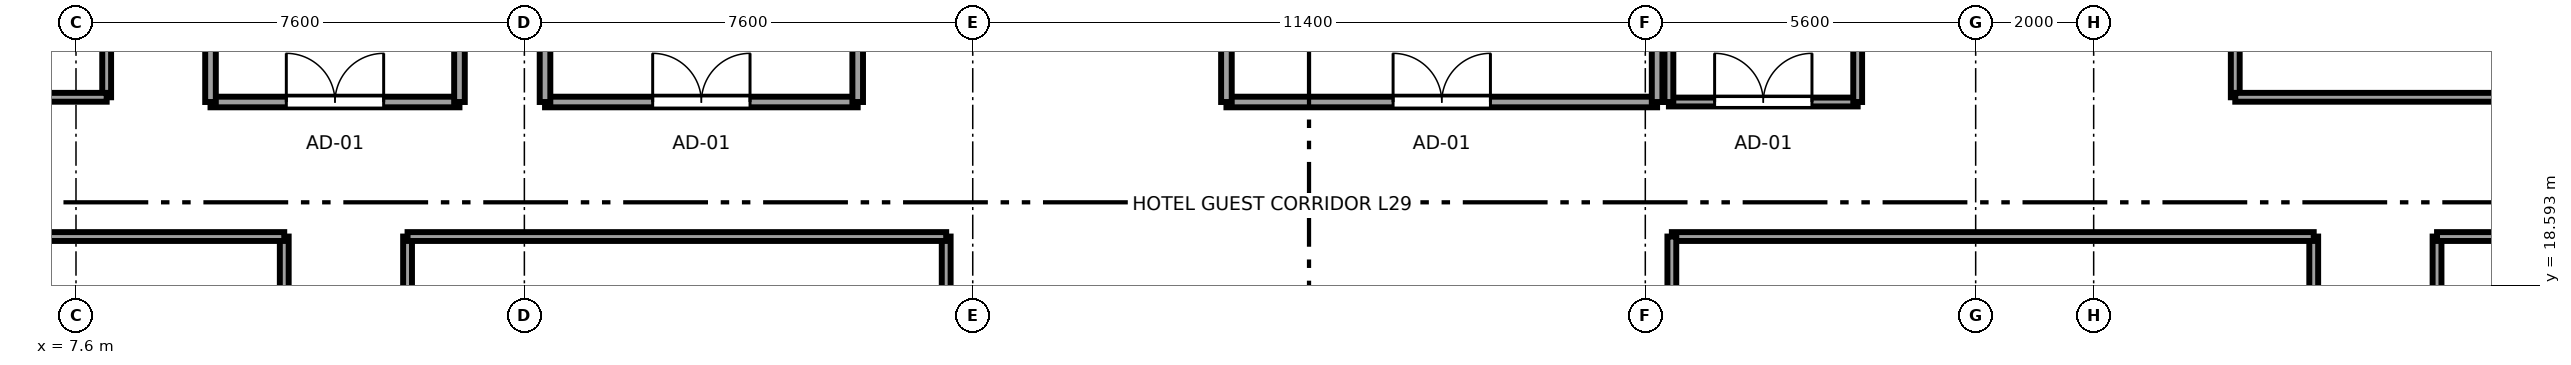
"""IFC4 building model, lengths in metres.
Left out: names, types, materials, properties, quantities, classifications, styles, units other than length and angle.
Written with IfcOpenShell. Run it as: python <this file> out.ifc"""

import sys

from ifc_helpers import new_model, si_unit, direction, frame, frame_2d, origin, place, context, subcontext, project, spatial, rectangle, extrude, source, transform, mapped, element, fill, save


model = new_model("IFC4")
c1 = context("Model", 3, precision=1e-05, world=origin(), true_north=direction((0.0, 1.0)))
c2 = subcontext(c1, "Body", "Model", "MODEL_VIEW")
j1 = project(units=[si_unit("LENGTHUNIT", "METRE"), si_unit("PLANEANGLEUNIT", "RADIAN")], contexts=[c1])
p1 = place(None, origin())
s1 = spatial("IfcSite", under=j1, at=p1, CompositionType="ELEMENT")
p2 = place(p1, origin())
s2 = spatial("IfcBuilding", under=s1, at=p2, CompositionType="ELEMENT")
p3 = place(p2, frame((0.0, 0.0, 115.1)))
s3 = spatial("IfcBuildingStorey", under=s2, at=p3, CompositionType="ELEMENT", Elevation=115.1)
p4 = place(p3, frame((11.13, 15.41, 0.0), z_axis=(0.0, 0.0, 1.0), x_axis=(0.0, 1.0, 0.0)))
e1 = element("IfcWall", 1, at=p4, inside=s3, PredefinedType="PARTITIONING", context=c2, shape_type="SweptSolid", body=[
    extrude(rectangle(XDim=4.01, YDim=0.15, at=frame_2d((2.005, 0.0))), origin(), (0.0, 0.0, 1.0), 3.37),
])
p5 = place(p4, frame((1.495, 0.0, 0.0)))
e2 = element("IfcOpeningElement", 2, at=p5, cuts=e1, PredefinedType="OPENING", context=c2, shape_type="SweptSolid", body=[
    extrude(rectangle(XDim=0.98, YDim=2.12, at=frame_2d((0.49, 1.06))), frame((0.0, 0.085, 0.0), z_axis=(0.0, -1.0, 0.0), x_axis=(1.0, 0.0, 0.0)), (0.0, 0.0, 1.0), 0.17),
])
p6 = place(p3, frame((0.405, 19.42, 0.0), z_axis=(0.0, 0.0, 1.0), x_axis=(1.0, 0.0, 0.0)))
e3 = element("IfcWall", 3, at=p6, inside=s3, PredefinedType="PARTITIONING", context=c2, shape_type="SweptSolid", body=[
    extrude(rectangle(XDim=10.725, YDim=0.15, at=frame_2d((5.362, 0.0))), origin(), (0.0, 0.0, 1.0), 3.37),
])
p7 = place(p3, frame((13.22, 12.01, 0.0), z_axis=(0.0, 0.0, 1.0), x_axis=(0.0, 1.0, 0.0)))
e4 = element("IfcWall", 4, at=p7, inside=s3, PredefinedType="PARTITIONING", context=c2, shape_type="SweptSolid", body=[
    extrude(rectangle(XDim=7.41, YDim=0.15, at=frame_2d((3.705, 0.0))), origin(), (0.0, 0.0, 1.0), 3.37),
])
p8 = place(p7, frame((3.195, 0.0, 0.0)))
e5 = element("IfcOpeningElement", 5, at=p8, cuts=e4, PredefinedType="OPENING", context=c2, shape_type="SweptSolid", body=[
    extrude(rectangle(XDim=0.98, YDim=2.12, at=frame_2d((0.49, 1.06))), frame((0.0, 0.085, 0.0), z_axis=(0.0, -1.0, 0.0), x_axis=(1.0, 0.0, 0.0)), (0.0, 0.0, 1.0), 0.17),
])
p9 = place(p3, frame((22.35, 9.68, 0.0), z_axis=(0.0, 0.0, 1.0), x_axis=(0.0, 1.0, 0.0)))
e6 = element("IfcWall", 6, at=p9, inside=s3, PredefinedType="PARTITIONING", context=c2, shape_type="SweptSolid", body=[
    extrude(rectangle(XDim=9.74, YDim=0.15, at=frame_2d((4.87, 0.0))), origin(), (0.0, 0.0, 1.0), 3.37),
])
p10 = place(p3, frame((13.22, 19.42, 0.0), z_axis=(0.0, 0.0, 1.0), x_axis=(1.0, 0.0, 0.0)))
e7 = element("IfcWall", 7, at=p10, inside=s3, PredefinedType="PARTITIONING", context=c2, shape_type="SweptSolid", body=[
    extrude(rectangle(XDim=9.13, YDim=0.15, at=frame_2d((4.565, 0.0))), origin(), (0.0, 0.0, 1.0), 3.37),
])
p11 = place(p3, frame((45.53, 16.61, 0.0), z_axis=(0.0, 0.0, 1.0), x_axis=(0.0, 1.0, 0.0)))
e8 = element("IfcWall", 8, at=p11, inside=s3, PredefinedType="PARTITIONING", context=c2, shape_type="SweptSolid", body=[
    extrude(rectangle(XDim=2.81, YDim=0.15, at=frame_2d((1.405, 0.0))), origin(), (0.0, 0.0, 1.0), 2.954),
])
p12 = place(p11, frame((0.895, 0.0, 0.0)))
e9 = element("IfcOpeningElement", 9, at=p12, cuts=e8, PredefinedType="OPENING", context=c2, shape_type="SweptSolid", body=[
    extrude(rectangle(XDim=0.98, YDim=2.12, at=frame_2d((0.49, 1.06))), frame((0.0, 0.085, 0.0), z_axis=(0.0, -1.0, 0.0), x_axis=(1.0, 0.0, 0.0)), (0.0, 0.0, 1.0), 0.17),
])
p13 = place(p3, frame((34.65, 19.42, 0.0), z_axis=(0.0, 0.0, 1.0), x_axis=(1.0, 0.0, 0.0)))
e10 = element("IfcWall", 10, at=p13, inside=s3, PredefinedType="PARTITIONING", context=c2, shape_type="SweptSolid", body=[
    extrude(rectangle(XDim=10.88, YDim=0.15, at=frame_2d((5.44, 0.0))), origin(), (0.0, 0.0, 1.0), 3.37),
])
p14 = place(p3, frame((34.65, 14.68, 0.0), z_axis=(0.0, 0.0, 1.0), x_axis=(0.0, 1.0, 0.0)))
e11 = element("IfcWall", 11, at=p14, inside=s3, PredefinedType="PARTITIONING", context=c2, shape_type="SweptSolid", body=[
    extrude(rectangle(XDim=4.74, YDim=0.15, at=frame_2d((2.37, 0.0))), origin(), (0.0, 0.0, 1.0), 3.37),
])
p15 = place(p3, frame((47.62, 12.21, 0.0), z_axis=(0.0, 0.0, 1.0), x_axis=(0.0, 1.0, 0.0)))
e12 = element("IfcWall", 12, at=p15, inside=s3, PredefinedType="PARTITIONING", context=c2, shape_type="SweptSolid", body=[
    extrude(rectangle(XDim=7.21, YDim=0.15, at=frame_2d((3.605, 0.0))), origin(), (0.0, 0.0, 1.0), 3.37),
])
p16 = place(p15, frame((3.095, 0.0, 0.0)))
e13 = element("IfcOpeningElement", 13, at=p16, cuts=e12, PredefinedType="OPENING", context=c2, shape_type="SweptSolid", body=[
    extrude(rectangle(XDim=0.98, YDim=2.12, at=frame_2d((0.49, 1.06))), frame((0.0, 0.085, 0.0), z_axis=(0.0, -1.0, 0.0), x_axis=(1.0, 0.0, 0.0)), (0.0, 0.0, 1.0), 0.17),
])
p17 = place(p3, frame((47.62, 19.42, 0.0), z_axis=(0.0, 0.0, 1.0), x_axis=(1.0, 0.0, 0.0)))
e14 = element("IfcWall", 14, at=p17, inside=s3, PredefinedType="PARTITIONING", context=c2, shape_type="SweptSolid", body=[
    extrude(rectangle(XDim=8.975, YDim=0.15, at=frame_2d((4.487, 0.0))), origin(), (0.0, 0.0, 1.0), 3.37),
])
p18 = place(p3, frame((8.12, 21.78, 0.0), z_axis=(0.0, 0.0, 1.0), x_axis=(0.0, 1.0, 0.0)))
e15 = element("IfcWall", 15, at=p18, inside=s3, PredefinedType="PARTITIONING", context=c2, shape_type="SweptSolid", body=[
    extrude(rectangle(XDim=12.54, YDim=0.15, at=frame_2d((6.27, 0.0))), origin(), (0.0, 0.0, 1.0), 3.37),
])
p19 = place(p18, frame((5.78, 0.0, 0.0)))
e16 = element("IfcOpeningElement", 16, at=p19, cuts=e15, PredefinedType="OPENING", context=c2, shape_type="SweptSolid", body=[
    extrude(rectangle(XDim=0.98, YDim=2.12, at=frame_2d((0.49, 1.06))), frame((0.0, 0.085, 0.0), z_axis=(0.0, -1.0, 0.0), x_axis=(1.0, 0.0, 0.0)), (0.0, 0.0, 1.0), 0.17),
])
p20 = place(p3, frame((2.77, 21.78, 0.0), z_axis=(0.0, 0.0, 1.0), x_axis=(1.0, 0.0, 0.0)))
e17 = element("IfcWall", 17, at=p20, inside=s3, PredefinedType="PARTITIONING", context=c2, shape_type="SweptSolid", body=[
    extrude(rectangle(XDim=5.35, YDim=0.15, at=frame_2d((2.675, 0.0))), origin(), (0.0, 0.0, 1.0), 3.37),
])
p21 = place(p3, frame((44.2, 21.78, 0.0), z_axis=(0.0, 0.0, 1.0), x_axis=(0.0, 1.0, 0.0)))
e18 = element("IfcWall", 18, at=p21, inside=s3, PredefinedType="PARTITIONING", context=c2, shape_type="SweptSolid", body=[
    extrude(rectangle(XDim=9.34, YDim=0.15, at=frame_2d((4.67, 0.0))), origin(), (0.0, 0.0, 1.0), 3.37),
])
p22 = place(p21, frame((4.18, 0.0, 0.0)))
e19 = element("IfcOpeningElement", 19, at=p22, cuts=e18, PredefinedType="OPENING", context=c2, shape_type="SweptSolid", body=[
    extrude(rectangle(XDim=0.98, YDim=2.12, at=frame_2d((0.49, 1.06))), frame((0.0, 0.085, 0.0), z_axis=(0.0, -1.0, 0.0), x_axis=(1.0, 0.0, 0.0)), (0.0, 0.0, 1.0), 0.17),
])
p23 = place(p3, frame((44.2, 21.78, 0.0), z_axis=(0.0, 0.0, 1.0), x_axis=(1.0, 0.0, 0.0)))
e20 = element("IfcWall", 20, at=p23, inside=s3, PredefinedType="PARTITIONING", context=c2, shape_type="SweptSolid", body=[
    extrude(rectangle(XDim=12.395, YDim=0.15, at=frame_2d((6.198, 0.0))), origin(), (0.0, 0.0, 1.0), 3.37),
])
p24 = place(p3, frame((9.88, 21.7, 0.0), z_axis=(0.0, 0.0, 1.0), x_axis=(1.0, 0.0, 0.0)))
e21 = element("IfcWall", 21, at=p24, inside=s3, PredefinedType="PARTITIONING", context=c2, shape_type="SweptSolid", body=[
    extrude(rectangle(XDim=4.22, YDim=0.18, at=frame_2d((2.11, 0.0))), origin(), (0.0, 0.0, 1.0), 3.37),
])
p25 = place(p24, frame((1.285, 0.0, 0.0)))
e22 = element("IfcOpeningElement", 22, at=p25, cuts=e21, PredefinedType="OPENING", context=c2, shape_type="SweptSolid", body=[
    extrude(rectangle(XDim=1.65, YDim=2.15, at=frame_2d((0.825, 1.075))), frame((0.0, 0.1, 0.0), z_axis=(0.0, -1.0, 0.0), x_axis=(1.0, 0.0, 0.0)), (0.0, 0.0, 1.0), 0.2),
])
for number, where, z_axis, x_axis in (
    (23, (9.88, 21.7, 0.0), (0.0, 0.0, 1.0), (0.0, 1.0, 0.0)),
    (24, (14.1, 21.7, 0.0), (0.0, 0.0, 1.0), (0.0, 1.0, 0.0)),
):
    element("IfcWall", number, at=place(p3, frame(where, z_axis=z_axis, x_axis=x_axis)), inside=s3, PredefinedType="PARTITIONING", context=c2, shape_type="SweptSolid", body=[
        extrude(rectangle(XDim=8.05, YDim=0.18, at=frame_2d((4.025, 0.0))), origin(), (0.0, 0.0, 1.0), 3.37),
    ])
p26 = place(p3, frame((27.1, 21.7, 0.0), z_axis=(0.0, 0.0, 1.0), x_axis=(1.0, 0.0, 0.0)))
e25 = element("IfcWall", 25, at=p26, inside=s3, PredefinedType="PARTITIONING", context=c2, shape_type="SweptSolid", body=[
    extrude(rectangle(XDim=7.3, YDim=0.18, at=frame_2d((3.65, 0.0))), origin(), (0.0, 0.0, 1.0), 3.37),
])
p27 = place(p26, frame((2.825, 0.0, 0.0)))
e26 = element("IfcOpeningElement", 26, at=p27, cuts=e25, PredefinedType="OPENING", context=c2, shape_type="SweptSolid", body=[
    extrude(rectangle(XDim=1.65, YDim=2.15, at=frame_2d((0.825, 1.075))), frame((0.0, 0.1, 0.0), z_axis=(0.0, -1.0, 0.0), x_axis=(1.0, 0.0, 0.0)), (0.0, 0.0, 1.0), 0.2),
])
for number, where, z_axis, x_axis in (
    (27, (27.1, 21.7, 0.0), (0.0, 0.0, 1.0), (0.0, 1.0, 0.0)),
    (28, (34.4, 21.7, 0.0), (0.0, 0.0, 1.0), (0.0, 1.0, 0.0)),
):
    element("IfcWall", number, at=place(p3, frame(where, z_axis=z_axis, x_axis=x_axis)), inside=s3, PredefinedType="PARTITIONING", context=c2, shape_type="SweptSolid", body=[
        extrude(rectangle(XDim=8.1, YDim=0.18, at=frame_2d((4.05, 0.0))), origin(), (0.0, 0.0, 1.0), 3.37),
    ])
p28 = place(p3, frame((15.55, 21.7, 0.0), z_axis=(0.0, 0.0, 1.0), x_axis=(1.0, 0.0, 0.0)))
e29 = element("IfcWall", 29, at=p28, inside=s3, PredefinedType="PARTITIONING", context=c2, shape_type="SweptSolid", body=[
    extrude(rectangle(XDim=5.3, YDim=0.18, at=frame_2d((2.65, 0.0))), origin(), (0.0, 0.0, 1.0), 3.37),
])
p29 = place(p28, frame((1.825, 0.0, 0.0)))
e30 = element("IfcOpeningElement", 30, at=p29, cuts=e29, PredefinedType="OPENING", context=c2, shape_type="SweptSolid", body=[
    extrude(rectangle(XDim=1.65, YDim=2.15, at=frame_2d((0.825, 1.075))), frame((0.0, 0.1, 0.0), z_axis=(0.0, -1.0, 0.0), x_axis=(1.0, 0.0, 0.0)), (0.0, 0.0, 1.0), 0.2),
])
for number, where, z_axis, x_axis in (
    (31, (15.55, 21.7, 0.0), (0.0, 0.0, 1.0), (0.0, 1.0, 0.0)),
    (32, (20.85, 21.7, 0.0), (0.0, 0.0, 1.0), (0.0, 1.0, 0.0)),
):
    element("IfcWall", number, at=place(p3, frame(where, z_axis=z_axis, x_axis=x_axis)), inside=s3, PredefinedType="PARTITIONING", context=c2, shape_type="SweptSolid", body=[
        extrude(rectangle(XDim=8.1, YDim=0.18, at=frame_2d((4.05, 0.0))), origin(), (0.0, 0.0, 1.0), 3.37),
    ])
p30 = place(p3, frame((34.6, 21.7, 0.0), z_axis=(0.0, 0.0, 1.0), x_axis=(1.0, 0.0, 0.0)))
e33 = element("IfcWall", 33, at=p30, inside=s3, PredefinedType="PARTITIONING", context=c2, shape_type="SweptSolid", body=[
    extrude(rectangle(XDim=3.2, YDim=0.15, at=frame_2d((1.6, 0.0))), origin(), (0.0, 0.0, 1.0), 3.37),
])
p31 = place(p30, frame((0.775, 0.0, 0.0)))
e34 = element("IfcOpeningElement", 34, at=p31, cuts=e33, PredefinedType="OPENING", context=c2, shape_type="SweptSolid", body=[
    extrude(rectangle(XDim=1.65, YDim=2.15, at=frame_2d((0.825, 1.075))), frame((0.0, 0.085, 0.0), z_axis=(0.0, -1.0, 0.0), x_axis=(1.0, 0.0, 0.0)), (0.0, 0.0, 1.0), 0.17),
])
for number, where, z_axis, x_axis in (
    (35, (34.6, 21.7, 0.0), (0.0, 0.0, 1.0), (0.0, 1.0, 0.0)),
    (36, (37.8, 21.7, 0.0), (0.0, 0.0, 1.0), (0.0, 1.0, 0.0)),
):
    element("IfcWall", number, at=place(p3, frame(where, z_axis=z_axis, x_axis=x_axis)), inside=s3, PredefinedType="PARTITIONING", context=c2, shape_type="SweptSolid", body=[
        extrude(rectangle(XDim=7.7, YDim=0.15, at=frame_2d((3.85, 0.0))), origin(), (0.0, 0.0, 1.0), 3.37),
    ])
m1 = source(origin(), c2, "Body", "SweptSolid", [
    extrude(rectangle(XDim=1.65, YDim=2.15, at=frame_2d((0.825, 1.075))), frame((0.0, 0.025, 0.0), z_axis=(0.0, -1.0, 0.0), x_axis=(1.0, 0.0, 0.0)), (0.0, 0.0, 1.0), 0.05),
])
p32 = place(p25, origin())
e37 = element("IfcDoor", 37, at=p32, inside=s3, OperationType="DOUBLE_DOOR_SINGLE_SWING", PredefinedType="DOOR", context=c2, shape_type="MappedRepresentation", body=[
    mapped(m1, transform((0.0, 0.0, 0.0), x_axis=(1.0, 0.0, 0.0), y_axis=(0.0, 1.0, 0.0), z_axis=(0.0, 0.0, 1.0), scale=1.0)),
])
fill(e22, e37)
p33 = place(p27, origin())
e38 = element("IfcDoor", 38, at=p33, inside=s3, OperationType="DOUBLE_DOOR_SINGLE_SWING", PredefinedType="DOOR", context=c2, shape_type="MappedRepresentation", body=[
    mapped(m1, transform((0.0, 0.0, 0.0), x_axis=(1.0, 0.0, 0.0), y_axis=(0.0, 1.0, 0.0), z_axis=(0.0, 0.0, 1.0), scale=1.0)),
])
fill(e26, e38)
p34 = place(p29, origin())
e39 = element("IfcDoor", 39, at=p34, inside=s3, OperationType="DOUBLE_DOOR_SINGLE_SWING", PredefinedType="DOOR", context=c2, shape_type="MappedRepresentation", body=[
    mapped(m1, transform((0.0, 0.0, 0.0), x_axis=(1.0, 0.0, 0.0), y_axis=(0.0, 1.0, 0.0), z_axis=(0.0, 0.0, 1.0), scale=1.0)),
])
fill(e30, e39)
p35 = place(p31, origin())
e40 = element("IfcDoor", 40, at=p35, inside=s3, OperationType="DOUBLE_DOOR_SINGLE_SWING", PredefinedType="DOOR", context=c2, shape_type="MappedRepresentation", body=[
    mapped(m1, transform((0.0, 0.0, 0.0), x_axis=(1.0, 0.0, 0.0), y_axis=(0.0, 1.0, 0.0), z_axis=(0.0, 0.0, 1.0), scale=1.0)),
])
fill(e34, e40)
save(model, sys.argv[1])
